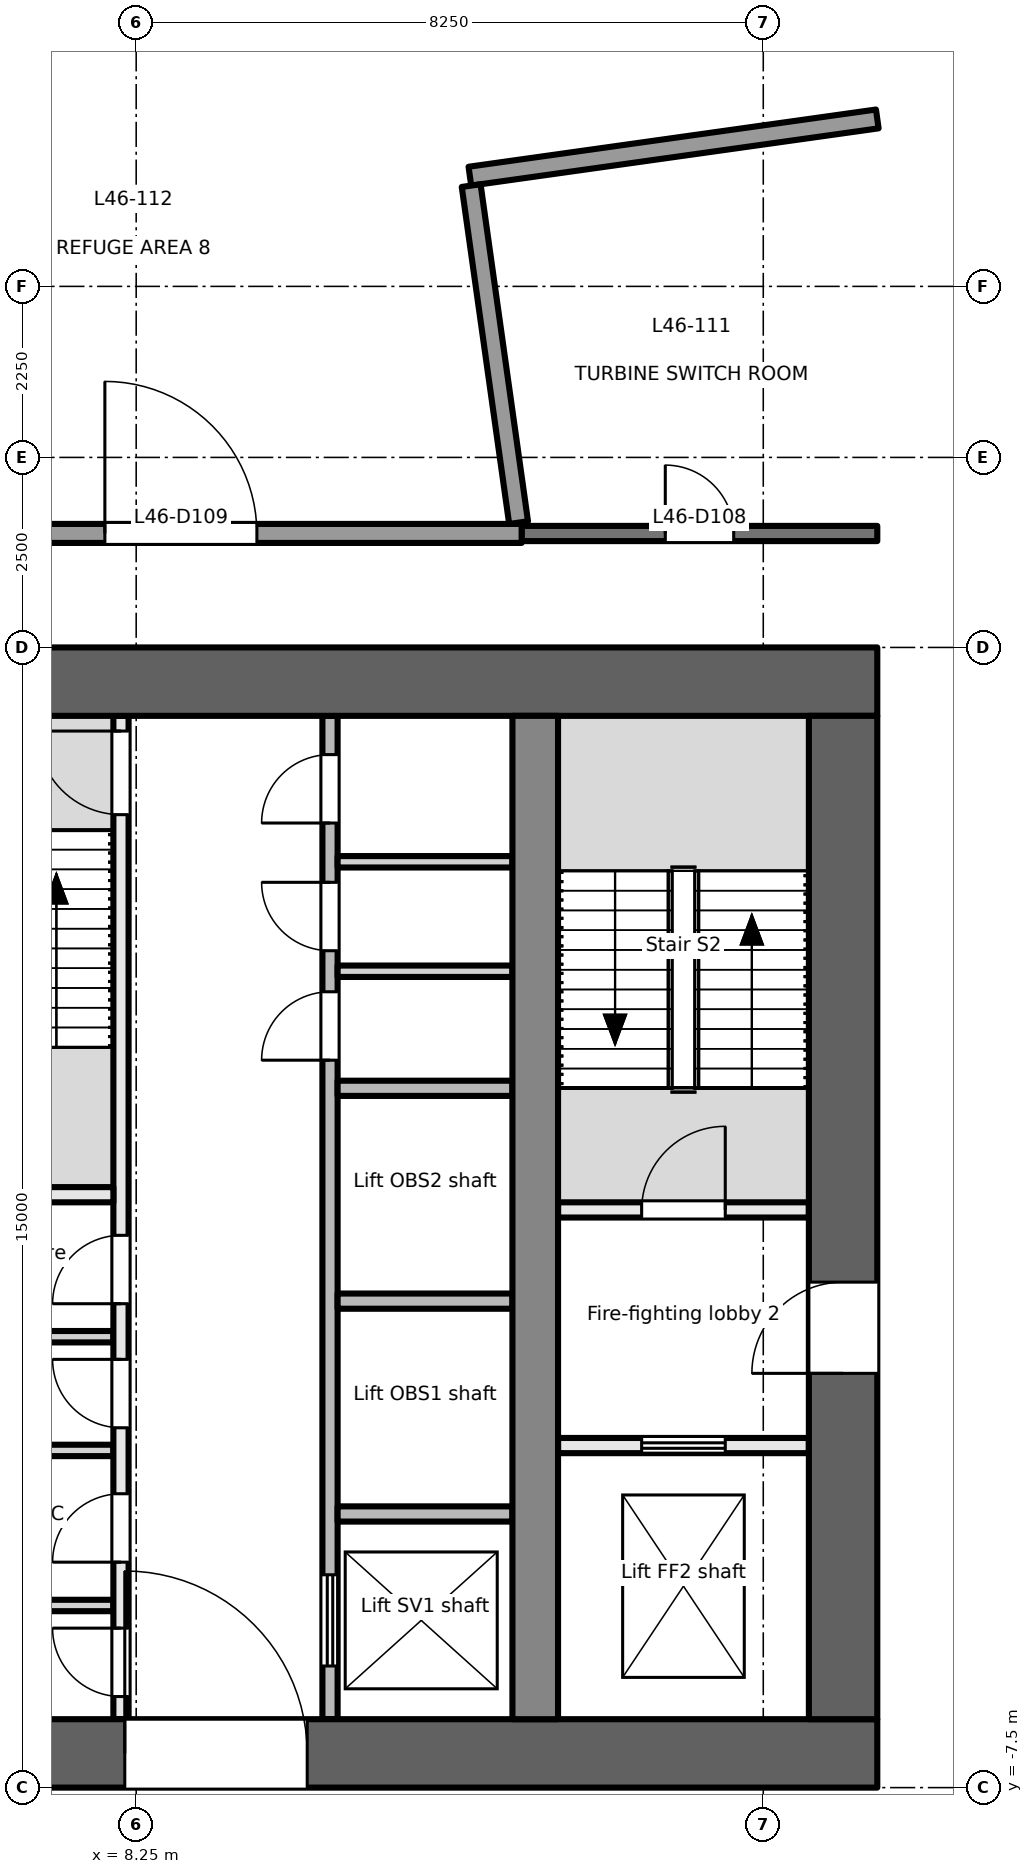
"""IFC4 building model, lengths in metres.
Left out: names, types, materials, properties, quantities, classifications, styles, units other than length and angle.
Written with IfcOpenShell. Run it as: python <this file> out.ifc"""

import sys

from ifc_helpers import new_model, si_unit, direction, frame, frame_2d, origin, place, context, subcontext, project, spatial, rectangle, extrude, element, fill, save


model = new_model("IFC4")
c1 = context("Model", 3, precision=1e-05, world=origin(), true_north=direction((0.0, 1.0)))
c2 = subcontext(c1, "Body", "Model", "MODEL_VIEW")
j1 = project(units=[si_unit("LENGTHUNIT", "METRE"), si_unit("PLANEANGLEUNIT", "RADIAN")], contexts=[c1])
p1 = place(None, origin())
s1 = spatial("IfcSite", under=j1, at=p1, CompositionType="ELEMENT")
p2 = place(p1, origin())
s2 = spatial("IfcBuilding", under=s1, at=p2, CompositionType="ELEMENT")
p3 = place(p2, frame((0.0, 0.0, 199.7)))
s3 = spatial("IfcBuildingStorey", under=s2, at=p3, CompositionType="ELEMENT", Elevation=199.7)
p4 = place(p3, frame((-18.0, -7.05, -0.2), z_axis=(0.0, 0.0, 1.0), x_axis=(1.0, 0.0, 0.0)))
e1 = element("IfcWall", 1, at=p4, inside=s3, PredefinedType="SHEAR", context=c2, shape_type="SweptSolid", body=[
    extrude(rectangle(XDim=36.0, YDim=0.9, at=frame_2d((18.0, 0.0))), origin(), (0.0, 0.0, 1.0), 8.4),
])
p5 = place(p4, frame((4.9, 0.0, 0.2)))
e2 = element("IfcOpeningElement", 2, at=p5, cuts=e1, PredefinedType="OPENING", context=c2, shape_type="SweptSolid", body=[
    extrude(rectangle(XDim=1.8, YDim=2.1, at=frame_2d((0.9, 1.05))), frame((0.0, 0.46, 0.0), z_axis=(0.0, -1.0, 0.0), x_axis=(1.0, 0.0, 0.0)), (0.0, 0.0, 1.0), 0.921),
])
p6 = place(p4, frame((17.4, 0.0, 0.2)))
e3 = element("IfcOpeningElement", 3, at=p6, cuts=e1, PredefinedType="OPENING", context=c2, shape_type="SweptSolid", body=[
    extrude(rectangle(XDim=1.2, YDim=2.1, at=frame_2d((0.6, 1.05))), frame((0.0, 0.46, 0.0), z_axis=(0.0, -1.0, 0.0), x_axis=(1.0, 0.0, 0.0)), (0.0, 0.0, 1.0), 0.921),
])
p7 = place(p4, frame((26.1, 0.0, 0.2)))
e4 = element("IfcOpeningElement", 4, at=p7, cuts=e1, PredefinedType="OPENING", context=c2, shape_type="SweptSolid", body=[
    extrude(rectangle(XDim=2.4, YDim=2.1, at=frame_2d((1.2, 1.05))), frame((0.0, 0.46, 0.0), z_axis=(0.0, -1.0, 0.0), x_axis=(1.0, 0.0, 0.0)), (0.0, 0.0, 1.0), 0.921),
])
p8 = place(p3, frame((-18.0, 7.05, -0.2), z_axis=(0.0, 0.0, 1.0), x_axis=(1.0, 0.0, 0.0)))
e5 = element("IfcWall", 5, at=p8, inside=s3, PredefinedType="SHEAR", context=c2, shape_type="SweptSolid", body=[
    extrude(rectangle(XDim=36.0, YDim=0.9, at=frame_2d((18.0, 0.0))), origin(), (0.0, 0.0, 1.0), 8.4),
])
p9 = place(p3, frame((17.55, -6.6, -0.2), z_axis=(0.0, 0.0, 1.0), x_axis=(0.0, 1.0, 0.0)))
e6 = element("IfcWall", 6, at=p9, inside=s3, PredefinedType="SHEAR", context=c2, shape_type="SweptSolid", body=[
    extrude(rectangle(XDim=13.2, YDim=0.9, at=frame_2d((6.6, 0.0))), origin(), (0.0, 0.0, 1.0), 8.4),
])
p10 = place(p9, frame((4.55, 0.0, 0.2)))
e7 = element("IfcOpeningElement", 7, at=p10, cuts=e6, PredefinedType="OPENING", context=c2, shape_type="SweptSolid", body=[
    extrude(rectangle(XDim=1.2, YDim=2.1, at=frame_2d((0.6, 1.05))), frame((0.0, 0.46, 0.0), z_axis=(0.0, -1.0, 0.0), x_axis=(1.0, 0.0, 0.0)), (0.0, 0.0, 1.0), 0.921),
])
p11 = place(p3, frame((13.5, -6.6, -0.2), z_axis=(0.0, 0.0, 1.0), x_axis=(0.0, 1.0, 0.0)))
e8 = element("IfcWall", 8, at=p11, inside=s3, PredefinedType="SHEAR", context=c2, shape_type="SweptSolid", body=[
    extrude(rectangle(XDim=13.2, YDim=0.6, at=frame_2d((6.6, 0.0))), origin(), (0.0, 0.0, 1.0), 8.4),
])
p12 = place(p3, frame((13.8, -3.0, 0.0), z_axis=(0.0, 0.0, 1.0), x_axis=(1.0, 0.0, 0.0)))
e9 = element("IfcWall", 9, at=p12, inside=s3, PredefinedType="PARTITIONING", context=c2, shape_type="SweptSolid", body=[
    extrude(rectangle(XDim=3.3, YDim=0.2, at=frame_2d((1.65, 0.0))), origin(), (0.0, 0.0, 1.0), 8.2),
])
p13 = place(p12, frame((1.1, 0.0, 0.0)))
e10 = element("IfcOpeningElement", 10, at=p13, cuts=e9, PredefinedType="OPENING", context=c2, shape_type="SweptSolid", body=[
    extrude(rectangle(XDim=1.1, YDim=2.1, at=frame_2d((0.55, 1.05))), frame((0.0, 0.111, 0.0), z_axis=(0.0, -1.0, 0.0), x_axis=(1.0, 0.0, 0.0)), (0.0, 0.0, 1.0), 0.221),
])
p14 = place(p3, frame((13.8, 0.1, 0.0), z_axis=(0.0, 0.0, 1.0), x_axis=(1.0, 0.0, 0.0)))
e11 = element("IfcWall", 11, at=p14, inside=s3, PredefinedType="PARTITIONING", context=c2, shape_type="SweptSolid", body=[
    extrude(rectangle(XDim=3.3, YDim=0.2, at=frame_2d((1.65, 0.0))), origin(), (0.0, 0.0, 1.0), 8.2),
])
p15 = place(p14, frame((1.1, 0.0, 0.0)))
e12 = element("IfcOpeningElement", 12, at=p15, cuts=e11, PredefinedType="OPENING", context=c2, shape_type="SweptSolid", body=[
    extrude(rectangle(XDim=1.1, YDim=2.1, at=frame_2d((0.55, 1.05))), frame((0.0, 0.111, 0.0), z_axis=(0.0, -1.0, 0.0), x_axis=(1.0, 0.0, 0.0)), (0.0, 0.0, 1.0), 0.221),
])
p16 = place(p3, frame((8.05, -6.6, 0.0), z_axis=(0.0, 0.0, 1.0), x_axis=(0.0, 1.0, 0.0)))
e13 = element("IfcWall", 13, at=p16, inside=s3, PredefinedType="PARTITIONING", context=c2, shape_type="SweptSolid", body=[
    extrude(rectangle(XDim=13.2, YDim=0.2, at=frame_2d((6.6, 0.0))), origin(), (0.0, 0.0, 1.0), 8.2),
])
p17 = place(p16, frame((0.298, 0.0, 0.0)))
e14 = element("IfcOpeningElement", 14, at=p17, cuts=e13, PredefinedType="OPENING", context=c2, shape_type="SweptSolid", body=[
    extrude(rectangle(XDim=0.9, YDim=2.1, at=frame_2d((0.45, 1.05))), frame((0.0, 0.111, 0.0), z_axis=(0.0, -1.0, 0.0), x_axis=(1.0, 0.0, 0.0)), (0.0, 0.0, 1.0), 0.221),
])
p18 = place(p16, frame((2.066, 0.0, 0.0)))
e15 = element("IfcOpeningElement", 15, at=p18, cuts=e13, PredefinedType="OPENING", context=c2, shape_type="SweptSolid", body=[
    extrude(rectangle(XDim=0.9, YDim=2.1, at=frame_2d((0.45, 1.05))), frame((0.0, 0.111, 0.0), z_axis=(0.0, -1.0, 0.0), x_axis=(1.0, 0.0, 0.0)), (0.0, 0.0, 1.0), 0.221),
])
p19 = place(p16, frame((3.834, 0.0, 0.0)))
e16 = element("IfcOpeningElement", 16, at=p19, cuts=e13, PredefinedType="OPENING", context=c2, shape_type="SweptSolid", body=[
    extrude(rectangle(XDim=0.9, YDim=2.1, at=frame_2d((0.45, 1.05))), frame((0.0, 0.111, 0.0), z_axis=(0.0, -1.0, 0.0), x_axis=(1.0, 0.0, 0.0)), (0.0, 0.0, 1.0), 0.221),
])
p20 = place(p16, frame((5.466, 0.0, 0.0)))
e17 = element("IfcOpeningElement", 17, at=p20, cuts=e13, PredefinedType="OPENING", context=c2, shape_type="SweptSolid", body=[
    extrude(rectangle(XDim=0.9, YDim=2.1, at=frame_2d((0.45, 1.05))), frame((0.0, 0.111, 0.0), z_axis=(0.0, -1.0, 0.0), x_axis=(1.0, 0.0, 0.0)), (0.0, 0.0, 1.0), 0.221),
])
p21 = place(p16, frame((11.9, 0.0, 0.0)))
e18 = element("IfcOpeningElement", 18, at=p21, cuts=e13, PredefinedType="OPENING", context=c2, shape_type="SweptSolid", body=[
    extrude(rectangle(XDim=1.1, YDim=2.1, at=frame_2d((0.55, 1.05))), frame((0.0, 0.111, 0.0), z_axis=(0.0, -1.0, 0.0), x_axis=(1.0, 0.0, 0.0)), (0.0, 0.0, 1.0), 0.221),
])
p22 = place(p3, frame((10.8, -6.6, 0.0), z_axis=(0.0, 0.0, 1.0), x_axis=(0.0, 1.0, 0.0)))
e19 = element("IfcWall", 19, at=p22, inside=s3, PredefinedType="PARTITIONING", context=c2, shape_type="SweptSolid", body=[
    extrude(rectangle(XDim=13.2, YDim=0.2, at=frame_2d((6.6, 0.0))), origin(), (0.0, 0.0, 1.0), 8.2),
])
p23 = place(p22, frame((0.7, 0.0, 0.0)))
e20 = element("IfcOpeningElement", 20, at=p23, cuts=e19, PredefinedType="OPENING", context=c2, shape_type="SweptSolid", body=[
    extrude(rectangle(XDim=1.2, YDim=2.1, at=frame_2d((0.6, 1.05))), frame((0.0, 0.111, 0.0), z_axis=(0.0, -1.0, 0.0), x_axis=(1.0, 0.0, 0.0)), (0.0, 0.0, 1.0), 0.221),
])
p24 = place(p22, frame((8.67, 0.0, 0.0)))
e21 = element("IfcOpeningElement", 21, at=p24, cuts=e19, PredefinedType="OPENING", context=c2, shape_type="SweptSolid", body=[
    extrude(rectangle(XDim=0.9, YDim=2.1, at=frame_2d((0.45, 1.05))), frame((0.0, 0.111, 0.0), z_axis=(0.0, -1.0, 0.0), x_axis=(1.0, 0.0, 0.0)), (0.0, 0.0, 1.0), 0.221),
])
p25 = place(p22, frame((10.11, 0.0, 0.0)))
e22 = element("IfcOpeningElement", 22, at=p25, cuts=e19, PredefinedType="OPENING", context=c2, shape_type="SweptSolid", body=[
    extrude(rectangle(XDim=0.9, YDim=2.1, at=frame_2d((0.45, 1.05))), frame((0.0, 0.111, 0.0), z_axis=(0.0, -1.0, 0.0), x_axis=(1.0, 0.0, 0.0)), (0.0, 0.0, 1.0), 0.221),
])
p26 = place(p22, frame((11.79, 0.0, 0.0)))
e23 = element("IfcOpeningElement", 23, at=p26, cuts=e19, PredefinedType="OPENING", context=c2, shape_type="SweptSolid", body=[
    extrude(rectangle(XDim=0.9, YDim=2.1, at=frame_2d((0.45, 1.05))), frame((0.0, 0.111, 0.0), z_axis=(0.0, -1.0, 0.0), x_axis=(1.0, 0.0, 0.0)), (0.0, 0.0, 1.0), 0.221),
])
p27 = place(p3, frame((4.8, 0.3, 0.0), z_axis=(0.0, 0.0, 1.0), x_axis=(1.0, 0.0, 0.0)))
e24 = element("IfcWall", 24, at=p27, inside=s3, PredefinedType="PARTITIONING", context=c2, shape_type="SweptSolid", body=[
    extrude(rectangle(XDim=3.15, YDim=0.2, at=frame_2d((1.575, 0.0))), origin(), (0.0, 0.0, 1.0), 8.2),
])
for number, where, z_axis, x_axis in (
    (25, (4.8, -5.104, 0.0), (0.0, 0.0, 1.0), (1.0, 0.0, 0.0)),
    (26, (4.8, -3.064, 0.0), (0.0, 0.0, 1.0), (1.0, 0.0, 0.0)),
    (27, (4.8, -1.568, 0.0), (0.0, 0.0, 1.0), (1.0, 0.0, 0.0)),
):
    element("IfcWall", number, at=place(p3, frame(where, z_axis=z_axis, x_axis=x_axis)), inside=s3, PredefinedType="PARTITIONING", context=c2, shape_type="SweptSolid", body=[
        extrude(rectangle(XDim=3.15, YDim=0.15, at=frame_2d((1.575, 0.0))), origin(), (0.0, 0.0, 1.0), 8.2),
    ])
for number, where, z_axis, x_axis in (
    (28, (10.9, -3.9, 0.0), (0.0, 0.0, 1.0), (1.0, 0.0, 0.0)),
    (29, (10.9, -1.1, 0.0), (0.0, 0.0, 1.0), (1.0, 0.0, 0.0)),
    (30, (10.9, 1.7, 0.0), (0.0, 0.0, 1.0), (1.0, 0.0, 0.0)),
):
    element("IfcWall", number, at=place(p3, frame(where, z_axis=z_axis, x_axis=x_axis)), inside=s3, PredefinedType="PARTITIONING", context=c2, shape_type="SweptSolid", body=[
        extrude(rectangle(XDim=2.3, YDim=0.2, at=frame_2d((1.15, 0.0))), origin(), (0.0, 0.0, 1.0), 8.2),
    ])
for number, where, z_axis, x_axis in (
    (31, (10.9, 3.24, 0.0), (0.0, 0.0, 1.0), (1.0, 0.0, 0.0)),
    (32, (10.9, 4.68, 0.0), (0.0, 0.0, 1.0), (1.0, 0.0, 0.0)),
):
    element("IfcWall", number, at=place(p3, frame(where, z_axis=z_axis, x_axis=x_axis)), inside=s3, PredefinedType="PARTITIONING", context=c2, shape_type="SweptSolid", body=[
        extrude(rectangle(XDim=2.3, YDim=0.15, at=frame_2d((1.15, 0.0))), origin(), (0.0, 0.0, 1.0), 8.2),
    ])
p28 = place(p3, frame((13.321, 8.999, 0.0), z_axis=(0.0, 0.0, 1.0), x_axis=(1.0, 0.0, 0.0)))
e33 = element("IfcWall", 33, at=p28, inside=s3, PredefinedType="PARTITIONING", context=c2, shape_type="SweptSolid", body=[
    extrude(rectangle(XDim=4.679, YDim=0.2, at=frame_2d((2.339, 0.0))), origin(), (0.0, 0.0, 1.0), 7.84),
])
p29 = place(p28, frame((1.89, 0.0, 0.0)))
e34 = element("IfcOpeningElement", 34, at=p29, cuts=e33, PredefinedType="OPENING", context=c2, shape_type="SweptSolid", body=[
    extrude(rectangle(XDim=0.9, YDim=2.1, at=frame_2d((0.45, 1.05))), frame((0.0, 0.111, 0.0), z_axis=(0.0, -1.0, 0.0), x_axis=(1.0, 0.0, 0.0)), (0.0, 0.0, 1.0), 0.221),
])
p30 = place(p3, frame((4.356, 9.0, 0.0), z_axis=(0.0, 0.0, 1.0), x_axis=(1.0, 0.0, 0.0)))
e35 = element("IfcWall", 35, at=p30, inside=s3, PredefinedType="PARTITIONING", context=c2, shape_type="SweptSolid", body=[
    extrude(rectangle(XDim=8.965, YDim=0.25, at=frame_2d((4.482, 0.0))), origin(), (0.0, 0.0, 1.0), 7.84),
])
p31 = place(p30, frame((3.482, 0.0, 0.0)))
e36 = element("IfcOpeningElement", 36, at=p31, cuts=e35, PredefinedType="OPENING", context=c2, shape_type="SweptSolid", body=[
    extrude(rectangle(XDim=2.0, YDim=2.1, at=frame_2d((1.0, 1.05))), frame((0.0, 0.135, 0.0), z_axis=(0.0, -1.0, 0.0), x_axis=(1.0, 0.0, 0.0)), (0.0, 0.0, 1.0), 0.271),
])
p32 = place(p3, frame((12.64, 13.7, 0.0), z_axis=(0.0, 0.0, 1.0), x_axis=(0.990277850905, 0.13910347949, 0.0)))
e37 = element("IfcWall", 37, at=p32, inside=s3, PredefinedType="PARTITIONING", context=c2, shape_type="SweptSolid", body=[
    extrude(rectangle(XDim=5.413, YDim=0.25, at=frame_2d((2.707, 0.0))), origin(), (0.0, 0.0, 1.0), 7.84),
])
p33 = place(p3, frame((13.281, 9.142, 0.0), z_axis=(0.0, 0.0, 1.0), x_axis=(-0.139367615221, 0.990240712063, 0.0)))
e38 = element("IfcWall", 38, at=p33, inside=s3, PredefinedType="PARTITIONING", context=c2, shape_type="SweptSolid", body=[
    extrude(rectangle(XDim=4.478, YDim=0.25, at=frame_2d((2.239, 0.0))), origin(), (0.0, 0.0, 1.0), 8.2),
])
p34 = place(p13, origin())
e39 = element("IfcDoor", 39, at=p34, inside=s3, OperationType="DOUBLE_DOOR_SLIDING", PredefinedType="DOOR", context=c2, shape_type="SweptSolid", body=[
    extrude(rectangle(XDim=1.1, YDim=2.1, at=frame_2d((0.55, 1.05))), frame((0.0, 0.025, 0.0), z_axis=(0.0, -1.0, 0.0), x_axis=(1.0, 0.0, 0.0)), (0.0, 0.0, 1.0), 0.05),
])
fill(e10, e39)
p35 = place(p10, origin())
e40 = element("IfcDoor", 40, at=p35, inside=s3, OperationType="SINGLE_SWING_LEFT", PredefinedType="DOOR", context=c2, shape_type="SweptSolid", body=[
    extrude(rectangle(XDim=1.2, YDim=2.1, at=frame_2d((0.6, 1.05))), frame((0.0, 0.025, 0.0), z_axis=(0.0, -1.0, 0.0), x_axis=(1.0, 0.0, 0.0)), (0.0, 0.0, 1.0), 0.05),
])
fill(e7, e40)
p36 = place(p15, origin())
e41 = element("IfcDoor", 41, at=p36, inside=s3, OperationType="SINGLE_SWING_RIGHT", PredefinedType="DOOR", context=c2, shape_type="SweptSolid", body=[
    extrude(rectangle(XDim=1.1, YDim=2.1, at=frame_2d((0.55, 1.05))), frame((0.0, 0.025, 0.0), z_axis=(0.0, -1.0, 0.0), x_axis=(1.0, 0.0, 0.0)), (0.0, 0.0, 1.0), 0.05),
])
fill(e12, e41)
p37 = place(p17, origin())
e42 = element("IfcDoor", 42, at=p37, inside=s3, OperationType="SINGLE_SWING_RIGHT", PredefinedType="DOOR", context=c2, shape_type="SweptSolid", body=[
    extrude(rectangle(XDim=0.9, YDim=2.1, at=frame_2d((0.45, 1.05))), frame((0.0, 0.025, 0.0), z_axis=(0.0, -1.0, 0.0), x_axis=(1.0, 0.0, 0.0)), (0.0, 0.0, 1.0), 0.05),
])
fill(e14, e42)
p38 = place(p18, origin())
e43 = element("IfcDoor", 43, at=p38, inside=s3, OperationType="SINGLE_SWING_LEFT", PredefinedType="DOOR", context=c2, shape_type="SweptSolid", body=[
    extrude(rectangle(XDim=0.9, YDim=2.1, at=frame_2d((0.45, 1.05))), frame((0.0, 0.025, 0.0), z_axis=(0.0, -1.0, 0.0), x_axis=(1.0, 0.0, 0.0)), (0.0, 0.0, 1.0), 0.05),
])
fill(e15, e43)
p39 = place(p19, origin())
e44 = element("IfcDoor", 44, at=p39, inside=s3, OperationType="SINGLE_SWING_RIGHT", PredefinedType="DOOR", context=c2, shape_type="SweptSolid", body=[
    extrude(rectangle(XDim=0.9, YDim=2.1, at=frame_2d((0.45, 1.05))), frame((0.0, 0.025, 0.0), z_axis=(0.0, -1.0, 0.0), x_axis=(1.0, 0.0, 0.0)), (0.0, 0.0, 1.0), 0.05),
])
fill(e16, e44)
p40 = place(p20, origin())
e45 = element("IfcDoor", 45, at=p40, inside=s3, OperationType="SINGLE_SWING_LEFT", PredefinedType="DOOR", context=c2, shape_type="SweptSolid", body=[
    extrude(rectangle(XDim=0.9, YDim=2.1, at=frame_2d((0.45, 1.05))), frame((0.0, 0.025, 0.0), z_axis=(0.0, -1.0, 0.0), x_axis=(1.0, 0.0, 0.0)), (0.0, 0.0, 1.0), 0.05),
])
fill(e17, e45)
p41 = place(p21, origin())
e46 = element("IfcDoor", 46, at=p41, inside=s3, OperationType="SINGLE_SWING_RIGHT", PredefinedType="DOOR", context=c2, shape_type="SweptSolid", body=[
    extrude(rectangle(XDim=1.1, YDim=2.1, at=frame_2d((0.55, 1.05))), frame((0.0, 0.025, 0.0), z_axis=(0.0, -1.0, 0.0), x_axis=(1.0, 0.0, 0.0)), (0.0, 0.0, 1.0), 0.05),
])
fill(e18, e46)
p42 = place(p7, origin())
e47 = element("IfcDoor", 47, at=p42, inside=s3, OperationType="DOUBLE_DOOR_DOUBLE_SWING", PredefinedType="DOOR", context=c2, shape_type="SweptSolid", body=[
    extrude(rectangle(XDim=2.4, YDim=2.1, at=frame_2d((1.2, 1.05))), frame((0.0, 0.025, 0.0), z_axis=(0.0, -1.0, 0.0), x_axis=(1.0, 0.0, 0.0)), (0.0, 0.0, 1.0), 0.05),
])
fill(e4, e47)
p43 = place(p23, origin())
e48 = element("IfcDoor", 48, at=p43, inside=s3, OperationType="DOUBLE_DOOR_SLIDING", PredefinedType="DOOR", context=c2, shape_type="SweptSolid", body=[
    extrude(rectangle(XDim=1.2, YDim=2.1, at=frame_2d((0.6, 1.05))), frame((0.0, 0.025, 0.0), z_axis=(0.0, -1.0, 0.0), x_axis=(1.0, 0.0, 0.0)), (0.0, 0.0, 1.0), 0.05),
])
fill(e20, e48)
p44 = place(p24, origin())
e49 = element("IfcDoor", 49, at=p44, inside=s3, OperationType="SINGLE_SWING_LEFT", PredefinedType="DOOR", context=c2, shape_type="SweptSolid", body=[
    extrude(rectangle(XDim=0.9, YDim=2.1, at=frame_2d((0.45, 1.05))), frame((0.0, 0.025, 0.0), z_axis=(0.0, -1.0, 0.0), x_axis=(1.0, 0.0, 0.0)), (0.0, 0.0, 1.0), 0.05),
])
fill(e21, e49)
p45 = place(p25, origin())
e50 = element("IfcDoor", 50, at=p45, inside=s3, OperationType="SINGLE_SWING_RIGHT", PredefinedType="DOOR", context=c2, shape_type="SweptSolid", body=[
    extrude(rectangle(XDim=0.9, YDim=2.1, at=frame_2d((0.45, 1.05))), frame((0.0, 0.025, 0.0), z_axis=(0.0, -1.0, 0.0), x_axis=(1.0, 0.0, 0.0)), (0.0, 0.0, 1.0), 0.05),
])
fill(e22, e50)
p46 = place(p26, origin())
e51 = element("IfcDoor", 51, at=p46, inside=s3, OperationType="SINGLE_SWING_LEFT", PredefinedType="DOOR", context=c2, shape_type="SweptSolid", body=[
    extrude(rectangle(XDim=0.9, YDim=2.1, at=frame_2d((0.45, 1.05))), frame((0.0, 0.025, 0.0), z_axis=(0.0, -1.0, 0.0), x_axis=(1.0, 0.0, 0.0)), (0.0, 0.0, 1.0), 0.05),
])
fill(e23, e51)
p47 = place(p29, origin())
e52 = element("IfcDoor", 52, at=p47, inside=s3, OperationType="SINGLE_SWING_LEFT", PredefinedType="DOOR", context=c2, shape_type="SweptSolid", body=[
    extrude(rectangle(XDim=0.9, YDim=2.1, at=frame_2d((0.45, 1.05))), frame((0.0, 0.025, 0.0), z_axis=(0.0, -1.0, 0.0), x_axis=(1.0, 0.0, 0.0)), (0.0, 0.0, 1.0), 0.05),
])
fill(e34, e52)
p48 = place(p31, origin())
e53 = element("IfcDoor", 53, at=p48, inside=s3, OperationType="DOUBLE_DOOR_SINGLE_SWING", PredefinedType="DOOR", context=c2, shape_type="SweptSolid", body=[
    extrude(rectangle(XDim=2.0, YDim=2.1, at=frame_2d((1.0, 1.05))), frame((0.0, 0.025, 0.0), z_axis=(0.0, -1.0, 0.0), x_axis=(1.0, 0.0, 0.0)), (0.0, 0.0, 1.0), 0.05),
])
fill(e36, e53)
save(model, sys.argv[1])
